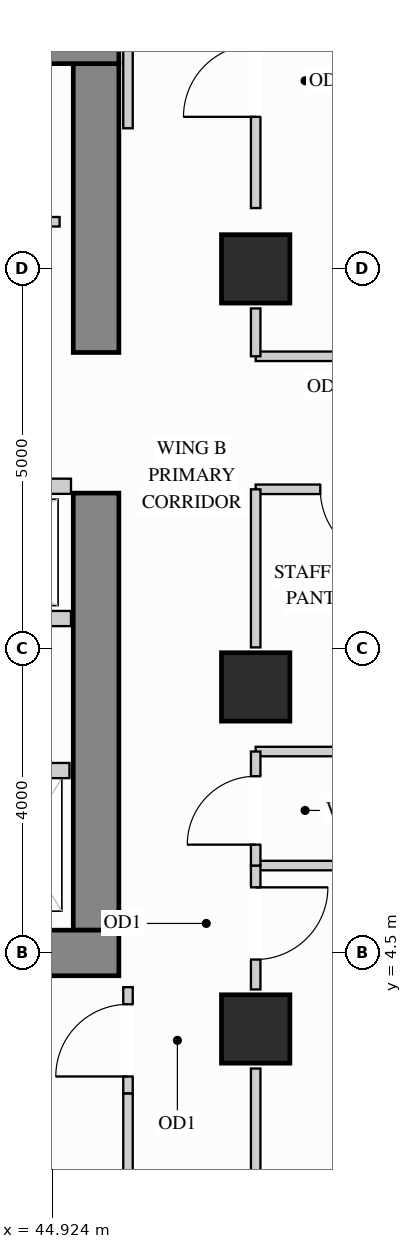
"""IFC4 building model, lengths in metres.
Left out: names, types, materials, properties, quantities, classifications, styles, units other than length and angle.
Written with IfcOpenShell. Run it as: python <this file> out.ifc"""

import sys

from ifc_helpers import new_model, si_unit, direction, frame, frame_2d, origin, origin_2d, place, context, subcontext, project, spatial, rectangle, extrude, source, transform, mapped, element, fill, save


model = new_model("IFC4")
c1 = context("Model", 3, precision=1e-05, world=origin(), true_north=direction((0.0, 1.0)))
c2 = subcontext(c1, "Body", "Model", "MODEL_VIEW")
j1 = project(units=[si_unit("LENGTHUNIT", "METRE"), si_unit("PLANEANGLEUNIT", "RADIAN")], contexts=[c1])
p1 = place(None, origin())
s1 = spatial("IfcSite", under=j1, at=p1, CompositionType="ELEMENT")
p2 = place(p1, origin())
s2 = spatial("IfcBuilding", under=s1, at=p2, CompositionType="ELEMENT")
p3 = place(p2, frame((0.0, 0.0, 161.1)))
s3 = spatial("IfcBuildingStorey", under=s2, at=p3, CompositionType="ELEMENT", Elevation=161.1)
m1 = source(origin(), c2, "Body", "SweptSolid", [
    extrude(rectangle(XDim=0.9, YDim=0.9, at=origin_2d()), origin(), (0.0, 0.0, 1.0), 3.4),
])
for number, where, z_axis, x_axis in (
    (1, (47.6, 13.5, 0.0), (0.0, 0.0, 1.0), (1.0, 0.0, 0.0)),
    (2, (47.6, 3.5, 0.0), (0.0, 0.0, 1.0), (1.0, 0.0, 0.0)),
    (3, (47.6, 8.0, 0.0), (0.0, 0.0, 1.0), (1.0, 0.0, 0.0)),
):
    element("IfcColumn", number, at=place(p3, frame(where, z_axis=z_axis, x_axis=x_axis)), inside=s3, PredefinedType="COLUMN", context=c2, shape_type="MappedRepresentation", body=[
        mapped(m1, transform((0.0, 0.0, 0.0), x_axis=(1.0, 0.0, 0.0), y_axis=(0.0, 1.0, 0.0), z_axis=(0.0, 0.0, 1.0))),
    ])
m2 = source(origin(), c2, "Body", "SweptSolid", [
    extrude(rectangle(XDim=5.75, YDim=0.6, at=frame_2d((2.875, 0.0))), origin(), (0.0, 0.0, 1.0), 3.4),
])
p4 = place(p3, frame((45.5, 4.8, 0.0), z_axis=(0.0, 0.0, 1.0), x_axis=(0.0, 1.0, 0.0)))
e4 = element("IfcWall", 4, at=p4, inside=s3, PredefinedType="SHEAR", context=c2, shape_type="MappedRepresentation", body=[
    mapped(m2, transform((0.0, 0.0, 0.0), x_axis=(1.0, 0.0, 0.0), y_axis=(0.0, 1.0, 0.0), z_axis=(0.0, 0.0, 1.0))),
])
m3 = source(origin(), c2, "Body", "SweptSolid", [
    extrude(rectangle(XDim=3.8, YDim=0.6, at=frame_2d((1.9, 0.0))), origin(), (0.0, 0.0, 1.0), 3.4),
])
p5 = place(p3, frame((45.5, 12.4, 0.0), z_axis=(0.0, 0.0, 1.0), x_axis=(0.0, 1.0, 0.0)))
e5 = element("IfcWall", 5, at=p5, inside=s3, PredefinedType="SHEAR", context=c2, shape_type="MappedRepresentation", body=[
    mapped(m3, transform((0.0, 0.0, 0.0), x_axis=(1.0, 0.0, 0.0), y_axis=(0.0, 1.0, 0.0), z_axis=(0.0, 0.0, 1.0))),
])
m4 = source(origin(), c2, "Body", "SweptSolid", [
    extrude(rectangle(XDim=10.1, YDim=0.6, at=frame_2d((5.05, 0.0))), origin(), (0.0, 0.0, 1.0), 3.4),
])
for number, where, z_axis, x_axis in (
    (6, (35.7, 16.5, 0.0), (0.0, 0.0, 1.0), (1.0, 0.0, 0.0)),
    (7, (35.7, 4.5, 0.0), (0.0, 0.0, 1.0), (1.0, 0.0, 0.0)),
):
    element("IfcWall", number, at=place(p3, frame(where, z_axis=z_axis, x_axis=x_axis)), inside=s3, PredefinedType="SHEAR", context=c2, shape_type="MappedRepresentation", body=[
        mapped(m4, transform((0.0, 0.0, 0.0), x_axis=(1.0, 0.0, 0.0), y_axis=(0.0, 1.0, 0.0), z_axis=(0.0, 0.0, 1.0))),
    ])
p6 = place(p3, frame((40.75, 14.12, 0.0), z_axis=(0.0, 0.0, 1.0), x_axis=(1.0, 0.0, 0.0)))
e8 = element("IfcWall", 8, at=p6, inside=s3, PredefinedType="PARTITIONING", context=c2, shape_type="SweptSolid", body=[
    extrude(rectangle(XDim=4.27, YDim=0.125, at=frame_2d((2.135, 0.0))), origin(), (0.0, 0.0, 1.0), 3.385),
])
p7 = place(p6, frame((1.66, 0.0, 0.0)))
e9 = element("IfcOpeningElement", 9, at=p7, cuts=e8, PredefinedType="OPENING", context=c2, shape_type="SweptSolid", body=[
    extrude(rectangle(XDim=0.95, YDim=2.15, at=frame_2d((0.475, 1.075))), frame((0.0, 0.073, 0.0), z_axis=(0.0, -1.0, 0.0), x_axis=(1.0, 0.0, 0.0)), (0.0, 0.0, 1.0), 0.145),
])
m5 = source(origin(), c2, "Body", "SweptSolid", [
    extrude(rectangle(XDim=5.048, YDim=0.125, at=frame_2d((2.524, 0.0))), origin(), (0.0, 0.0, 1.0), 3.385),
])
for number, where, z_axis, x_axis in (
    (10, (47.6, 5.65, 0.0), (0.0, 0.0, 1.0), (1.0, 0.0, 0.0)),
    (11, (47.6, 7.15, 0.0), (0.0, 0.0, 1.0), (1.0, 0.0, 0.0)),
):
    element("IfcWall", number, at=place(p3, frame(where, z_axis=z_axis, x_axis=x_axis)), inside=s3, PredefinedType="PARTITIONING", context=c2, shape_type="MappedRepresentation", body=[
        mapped(m5, transform((0.0, 0.0, 0.0), x_axis=(1.0, 0.0, 0.0), y_axis=(0.0, 1.0, 0.0), z_axis=(0.0, 0.0, 1.0))),
    ])
m6 = source(origin(), c2, "Body", "SweptSolid", [
    extrude(rectangle(XDim=2.65, YDim=0.125, at=frame_2d((1.325, 0.0))), origin(), (0.0, 0.0, 1.0), 3.385),
])
p8 = place(p3, frame((47.6, 12.35, 0.0), z_axis=(0.0, 0.0, 1.0), x_axis=(1.0, 0.0, 0.0)))
e12 = element("IfcWall", 12, at=p8, inside=s3, PredefinedType="PARTITIONING", context=c2, shape_type="MappedRepresentation", body=[
    mapped(m6, transform((0.0, 0.0, 0.0), x_axis=(1.0, 0.0, 0.0), y_axis=(0.0, 1.0, 0.0), z_axis=(0.0, 0.0, 1.0))),
])
p9 = place(p3, frame((47.6, 10.6, 0.0), z_axis=(0.0, 0.0, 1.0), x_axis=(1.0, 0.0, 0.0)))
e13 = element("IfcWall", 13, at=p9, inside=s3, PredefinedType="PARTITIONING", context=c2, shape_type="SweptSolid", body=[
    extrude(rectangle(XDim=2.65, YDim=0.125, at=frame_2d((1.325, 0.0))), origin(), (0.0, 0.0, 1.0), 2.773),
])
p10 = place(p9, frame((0.85, 0.0, 0.0)))
e14 = element("IfcOpeningElement", 14, at=p10, cuts=e13, PredefinedType="OPENING", context=c2, shape_type="SweptSolid", body=[
    extrude(rectangle(XDim=0.95, YDim=2.15, at=frame_2d((0.475, 1.075))), frame((0.0, 0.073, 0.0), z_axis=(0.0, -1.0, 0.0), x_axis=(1.0, 0.0, 0.0)), (0.0, 0.0, 1.0), 0.145),
])
p11 = place(p3, frame((47.6, 4.02, 0.0), z_axis=(0.0, 0.0, 1.0), x_axis=(0.0, 1.0, 0.0)))
e15 = element("IfcWall", 15, at=p11, inside=s3, PredefinedType="PARTITIONING", context=c2, shape_type="SweptSolid", body=[
    extrude(rectangle(XDim=1.63, YDim=0.125, at=frame_2d((0.815, 0.0))), origin(), (0.0, 0.0, 1.0), 2.773),
])
p12 = place(p11, frame((0.393, 0.0, 0.0)))
e16 = element("IfcOpeningElement", 16, at=p12, cuts=e15, PredefinedType="OPENING", context=c2, shape_type="SweptSolid", body=[
    extrude(rectangle(XDim=0.95, YDim=2.15, at=frame_2d((0.475, 1.075))), frame((0.0, 0.073, 0.0), z_axis=(0.0, -1.0, 0.0), x_axis=(1.0, 0.0, 0.0)), (0.0, 0.0, 1.0), 0.145),
])
m7 = source(origin(), c2, "Body", "SweptSolid", [
    extrude(rectangle(XDim=1.86, YDim=0.125, at=frame_2d((0.93, 0.0))), origin(), (0.0, 0.0, 1.0), 2.773),
])
p13 = place(p3, frame((47.6, 1.12, 0.0), z_axis=(0.0, 0.0, 1.0), x_axis=(0.0, 1.0, 0.0)))
e17 = element("IfcWall", 17, at=p13, inside=s3, PredefinedType="PARTITIONING", context=c2, shape_type="MappedRepresentation", body=[
    mapped(m7, transform((0.0, 0.0, 0.0), x_axis=(1.0, 0.0, 0.0), y_axis=(0.0, 1.0, 0.0), z_axis=(0.0, 0.0, 1.0))),
])
m8 = source(origin(), c2, "Body", "SweptSolid", [
    extrude(rectangle(XDim=2.08, YDim=0.125, at=frame_2d((1.04, 0.0))), origin(), (0.0, 0.0, 1.0), 2.773),
])
p14 = place(p3, frame((47.6, 8.52, 0.0), z_axis=(0.0, 0.0, 1.0), x_axis=(0.0, 1.0, 0.0)))
e18 = element("IfcWall", 18, at=p14, inside=s3, PredefinedType="PARTITIONING", context=c2, shape_type="MappedRepresentation", body=[
    mapped(m8, transform((0.0, 0.0, 0.0), x_axis=(1.0, 0.0, 0.0), y_axis=(0.0, 1.0, 0.0), z_axis=(0.0, 0.0, 1.0))),
])
p15 = place(p3, frame((47.6, 14.3, 0.0), z_axis=(0.0, 0.0, 1.0), x_axis=(0.0, 1.0, 0.0)))
e19 = element("IfcWall", 19, at=p15, inside=s3, PredefinedType="PARTITIONING", context=c2, shape_type="SweptSolid", body=[
    extrude(rectangle(XDim=2.58, YDim=0.125, at=frame_2d((1.29, 0.0))), origin(), (0.0, 0.0, 1.0), 2.773),
])
p16 = place(p15, frame((1.2, 0.0, 0.0)))
e20 = element("IfcOpeningElement", 20, at=p16, cuts=e19, PredefinedType="OPENING", context=c2, shape_type="SweptSolid", body=[
    extrude(rectangle(XDim=0.95, YDim=2.15, at=frame_2d((0.475, 1.075))), frame((0.0, 0.073, 0.0), z_axis=(0.0, -1.0, 0.0), x_axis=(1.0, 0.0, 0.0)), (0.0, 0.0, 1.0), 0.145),
])
m9 = source(origin(), c2, "Body", "SweptSolid", [
    extrude(rectangle(XDim=0.63, YDim=0.125, at=frame_2d((0.315, 0.0))), origin(), (0.0, 0.0, 1.0), 2.773),
])
p17 = place(p3, frame((47.6, 12.35, 0.0), z_axis=(0.0, 0.0, 1.0), x_axis=(0.0, 1.0, 0.0)))
e21 = element("IfcWall", 21, at=p17, inside=s3, PredefinedType="PARTITIONING", context=c2, shape_type="MappedRepresentation", body=[
    mapped(m9, transform((0.0, 0.0, 0.0), x_axis=(1.0, 0.0, 0.0), y_axis=(0.0, 1.0, 0.0), z_axis=(0.0, 0.0, 1.0))),
])
p18 = place(p3, frame((47.6, 5.65, 0.0), z_axis=(0.0, 0.0, 1.0), x_axis=(0.0, 1.0, 0.0)))
e22 = element("IfcWall", 22, at=p18, inside=s3, PredefinedType="PARTITIONING", context=c2, shape_type="SweptSolid", body=[
    extrude(rectangle(XDim=1.5, YDim=0.125, at=frame_2d((0.75, 0.0))), origin(), (0.0, 0.0, 1.0), 2.773),
])
p19 = place(p18, frame((0.275, 0.0, 0.0)))
e23 = element("IfcOpeningElement", 23, at=p19, cuts=e22, PredefinedType="OPENING", context=c2, shape_type="SweptSolid", body=[
    extrude(rectangle(XDim=0.9, YDim=2.15, at=frame_2d((0.45, 1.075))), frame((0.0, 0.073, 0.0), z_axis=(0.0, -1.0, 0.0), x_axis=(1.0, 0.0, 0.0)), (0.0, 0.0, 1.0), 0.145),
])
m10 = source(origin(), c2, "Body", "SweptSolid", [
    extrude(rectangle(XDim=2.298, YDim=0.125, at=frame_2d((1.149, 0.0))), origin(), (0.0, 0.0, 1.0), 3.385),
])
p20 = place(p3, frame((45.92, 15.35, 0.0), z_axis=(0.0, 0.0, 1.0), x_axis=(0.0, 1.0, 0.0)))
e24 = element("IfcWall", 24, at=p20, inside=s3, PredefinedType="PARTITIONING", context=c2, shape_type="MappedRepresentation", body=[
    mapped(m10, transform((0.0, 0.0, 0.0), x_axis=(1.0, 0.0, 0.0), y_axis=(0.0, 1.0, 0.0), z_axis=(0.0, 0.0, 1.0))),
])
p21 = place(p3, frame((45.92, 2.65, 0.0), z_axis=(0.0, 0.0, 1.0), x_axis=(0.0, 1.0, 0.0)))
e25 = element("IfcWall", 25, at=p21, inside=s3, PredefinedType="PARTITIONING", context=c2, shape_type="SweptSolid", body=[
    extrude(rectangle(XDim=1.4, YDim=0.125, at=frame_2d((0.7, 0.0))), origin(), (0.0, 0.0, 1.0), 3.385),
])
p22 = place(p21, frame((0.225, 0.0, 0.0)))
e26 = element("IfcOpeningElement", 26, at=p22, cuts=e25, PredefinedType="OPENING", context=c2, shape_type="SweptSolid", body=[
    extrude(rectangle(XDim=0.95, YDim=2.15, at=frame_2d((0.475, 1.075))), frame((0.0, 0.073, 0.0), z_axis=(0.0, -1.0, 0.0), x_axis=(1.0, 0.0, 0.0)), (0.0, 0.0, 1.0), 0.145),
])
p23 = place(p3, frame((45.92, 0.352, 0.0), z_axis=(0.0, 0.0, 1.0), x_axis=(0.0, 1.0, 0.0)))
e27 = element("IfcWall", 27, at=p23, inside=s3, PredefinedType="PARTITIONING", context=c2, shape_type="MappedRepresentation", body=[
    mapped(m10, transform((0.0, 0.0, 0.0), x_axis=(1.0, 0.0, 0.0), y_axis=(0.0, 1.0, 0.0), z_axis=(0.0, 0.0, 1.0))),
])
m11 = source(origin(), c2, "Body", "SweptSolid", [
    extrude(rectangle(XDim=1.3, YDim=0.2, at=frame_2d((0.65, 0.0))), origin(), (0.0, 0.0, 1.0), 3.385),
])
p24 = place(p3, frame((43.85, 6.9, 0.0), z_axis=(0.0, 0.0, 1.0), x_axis=(1.0, 0.0, 0.0)))
e28 = element("IfcWall", 28, at=p24, inside=s3, PredefinedType="PARTITIONING", context=c2, shape_type="MappedRepresentation", body=[
    mapped(m11, transform((0.0, 0.0, 0.0), x_axis=(1.0, 0.0, 0.0), y_axis=(0.0, 1.0, 0.0), z_axis=(0.0, 0.0, 1.0))),
])
m12 = source(origin(), c2, "Body", "SweptSolid", [
    extrude(rectangle(XDim=3.49, YDim=0.2, at=frame_2d((1.745, 0.0))), origin(), (0.0, 0.0, 1.0), 3.385),
])
for number, where, z_axis, x_axis in (
    (29, (41.68, 10.64, 0.0), (0.0, 0.0, 1.0), (1.0, 0.0, 0.0)),
    (30, (41.68, 8.9, 0.0), (0.0, 0.0, 1.0), (1.0, 0.0, 0.0)),
):
    element("IfcWall", number, at=place(p3, frame(where, z_axis=z_axis, x_axis=x_axis)), inside=s3, PredefinedType="PARTITIONING", context=c2, shape_type="MappedRepresentation", body=[
        mapped(m12, transform((0.0, 0.0, 0.0), x_axis=(1.0, 0.0, 0.0), y_axis=(0.0, 1.0, 0.0), z_axis=(0.0, 0.0, 1.0))),
    ])
m13 = source(origin(), c2, "Body", "SweptSolid", [
    extrude(rectangle(XDim=0.95, YDim=2.15, at=frame_2d((0.475, 1.075))), frame((0.0, 0.025, 0.0), z_axis=(0.0, -1.0, 0.0), x_axis=(1.0, 0.0, 0.0)), (0.0, 0.0, 1.0), 0.05),
])
p25 = place(p22, origin())
e31 = element("IfcDoor", 31, at=p25, inside=s3, OperationType="SINGLE_SWING_LEFT", PredefinedType="DOOR", context=c2, shape_type="MappedRepresentation", body=[
    mapped(m13, transform((0.0, 0.0, 0.0), x_axis=(1.0, 0.0, 0.0), y_axis=(0.0, 1.0, 0.0), z_axis=(0.0, 0.0, 1.0))),
])
fill(e26, e31)
p26 = place(p12, origin())
e32 = element("IfcDoor", 32, at=p26, inside=s3, OperationType="SINGLE_SWING_RIGHT", PredefinedType="DOOR", context=c2, shape_type="MappedRepresentation", body=[
    mapped(m13, transform((0.0, 0.0, 0.0), x_axis=(1.0, 0.0, 0.0), y_axis=(0.0, 1.0, 0.0), z_axis=(0.0, 0.0, 1.0))),
])
fill(e16, e32)
p27 = place(p10, origin())
e33 = element("IfcDoor", 33, at=p27, inside=s3, OperationType="SINGLE_SWING_RIGHT", PredefinedType="DOOR", context=c2, shape_type="MappedRepresentation", body=[
    mapped(m13, transform((0.0, 0.0, 0.0), x_axis=(1.0, 0.0, 0.0), y_axis=(0.0, 1.0, 0.0), z_axis=(0.0, 0.0, 1.0))),
])
fill(e14, e33)
p28 = place(p16, origin())
e34 = element("IfcDoor", 34, at=p28, inside=s3, OperationType="SINGLE_SWING_LEFT", PredefinedType="DOOR", context=c2, shape_type="MappedRepresentation", body=[
    mapped(m13, transform((0.0, 0.0, 0.0), x_axis=(1.0, 0.0, 0.0), y_axis=(0.0, 1.0, 0.0), z_axis=(0.0, 0.0, 1.0))),
])
fill(e20, e34)
m14 = source(origin(), c2, "Body", "SweptSolid", [
    extrude(rectangle(XDim=0.9, YDim=2.15, at=frame_2d((0.45, 1.075))), frame((0.0, 0.025, 0.0), z_axis=(0.0, -1.0, 0.0), x_axis=(1.0, 0.0, 0.0)), (0.0, 0.0, 1.0), 0.05),
])
p29 = place(p19, origin())
e35 = element("IfcDoor", 35, at=p29, inside=s3, OperationType="SINGLE_SWING_LEFT", PredefinedType="DOOR", context=c2, shape_type="MappedRepresentation", body=[
    mapped(m14, transform((0.0, 0.0, 0.0), x_axis=(1.0, 0.0, 0.0), y_axis=(0.0, 1.0, 0.0), z_axis=(0.0, 0.0, 1.0))),
])
fill(e23, e35)
save(model, sys.argv[1])
